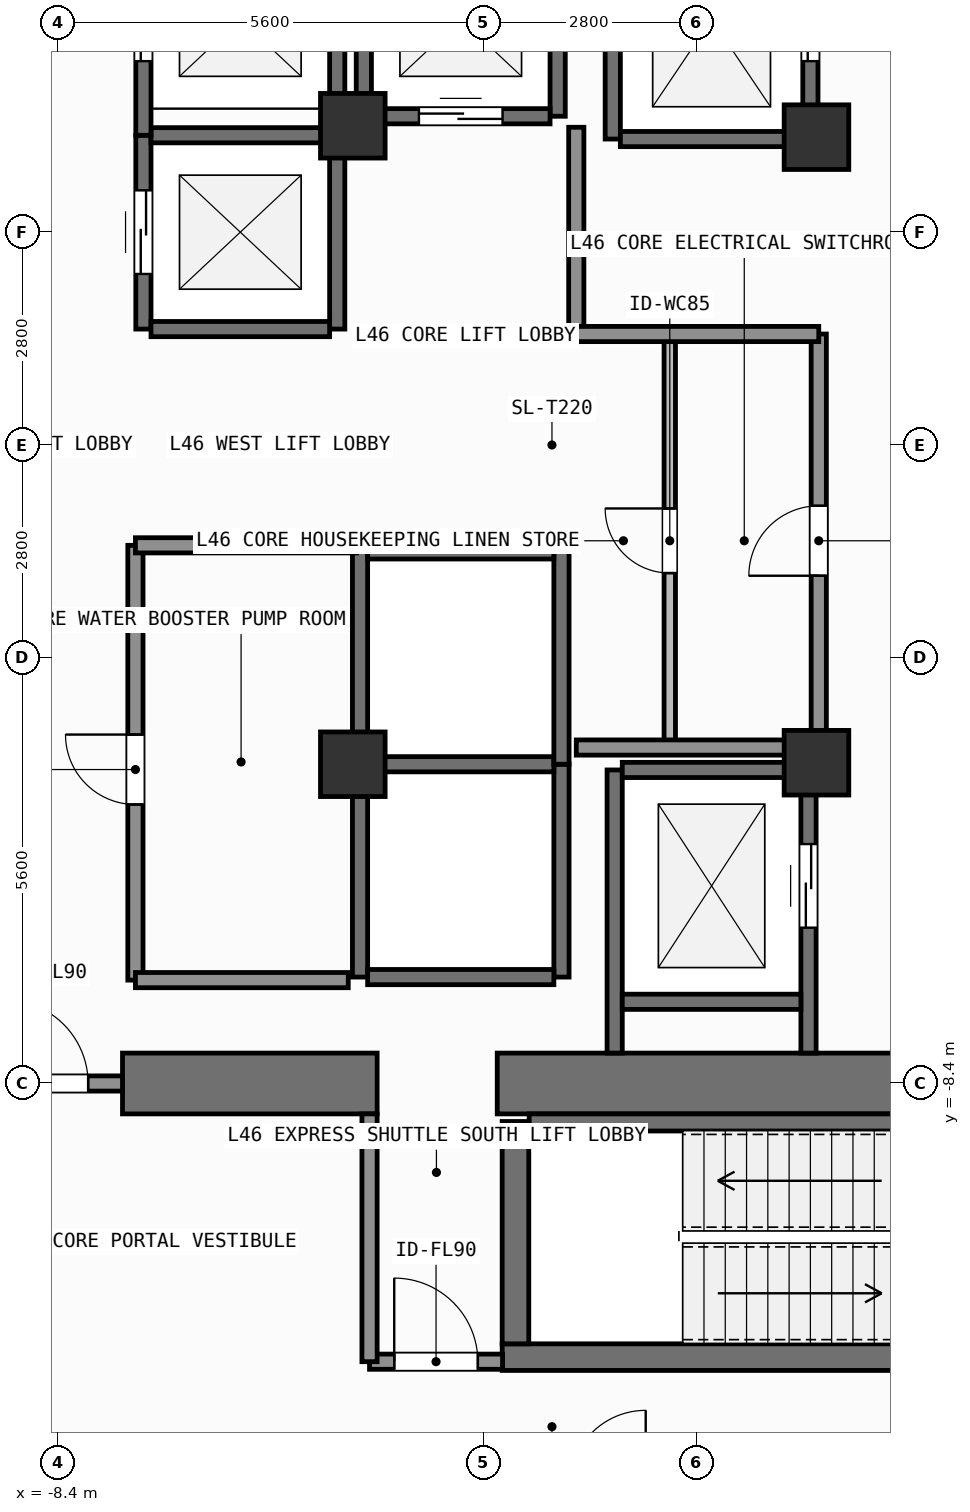
"""IFC4 building model, lengths in metres.
Left out: names, types, materials, properties, quantities, classifications, styles, units other than length and angle.
Written with IfcOpenShell. Run it as: python <this file> out.ifc"""

import sys

from ifc_helpers import new_model, si_unit, direction, frame, frame_2d, origin, origin_2d, place, context, subcontext, project, spatial, rectangle, extrude, element, fill, save


model = new_model("IFC4")
c1 = context("Model", 3, precision=1e-05, world=origin(), true_north=direction((0.0, 1.0)))
c2 = subcontext(c1, "Body", "Model", "MODEL_VIEW")
j1 = project(units=[si_unit("LENGTHUNIT", "METRE"), si_unit("PLANEANGLEUNIT", "RADIAN")], contexts=[c1])
p1 = place(None, origin())
s1 = spatial("IfcSite", under=j1, at=p1, CompositionType="ELEMENT")
p2 = place(p1, origin())
s2 = spatial("IfcBuilding", under=s1, at=p2, CompositionType="ELEMENT")
p3 = place(p2, frame((0.0, 0.0, 187.5)))
s3 = spatial("IfcBuildingStorey", under=s2, at=p3, CompositionType="ELEMENT", Elevation=187.5)
p4 = place(p3, frame((-7.55, -8.4, 0.0), z_axis=(0.0, 0.0, 1.0), x_axis=(1.0, 0.0, 0.0)))
e1 = element("IfcWall", 1, at=p4, inside=s3, PredefinedType="SHEAR", context=c2, shape_type="SweptSolid", body=[
    extrude(rectangle(XDim=3.35, YDim=0.8, at=frame_2d((1.675, 0.0))), origin(), (0.0, 0.0, 1.0), 3.9),
])
p5 = place(p3, frame((-2.62, -8.4, 0.0), z_axis=(0.0, 0.0, 1.0), x_axis=(1.0, 0.0, 0.0)))
e2 = element("IfcWall", 2, at=p5, inside=s3, PredefinedType="SHEAR", context=c2, shape_type="SweptSolid", body=[
    extrude(rectangle(XDim=7.27, YDim=0.8, at=frame_2d((3.635, 0.0))), origin(), (0.0, 0.0, 1.0), 3.9),
])
p6 = place(p3, frame((-2.555, -12.0, 0.0), z_axis=(0.0, 0.0, 1.0), x_axis=(1.0, 0.0, 0.0)))
e3 = element("IfcWall", 3, at=p6, inside=s3, PredefinedType="SHEAR", context=c2, shape_type="SweptSolid", body=[
    extrude(rectangle(XDim=7.31, YDim=0.35, at=frame_2d((3.655, 0.0))), origin(), (0.0, 0.0, 1.0), 3.9),
])
p7 = place(p3, frame((-2.2, -8.913, 0.0), z_axis=(0.0, 0.0, 1.0), x_axis=(1.0, 0.0, 0.0)))
e4 = element("IfcWall", 4, at=p7, inside=s3, PredefinedType="SHEAR", context=c2, shape_type="SweptSolid", body=[
    extrude(rectangle(XDim=6.6, YDim=0.225, at=frame_2d((3.3, 0.0))), origin(), (0.0, 0.0, 1.0), 3.9),
])
p8 = place(p3, frame((-2.38, -11.825, 0.0), z_axis=(0.0, 0.0, 1.0), x_axis=(0.0, 1.0, 0.0)))
e5 = element("IfcWall", 5, at=p8, inside=s3, PredefinedType="SHEAR", context=c2, shape_type="SweptSolid", body=[
    extrude(rectangle(XDim=2.925, YDim=0.35, at=frame_2d((1.462, 0.0))), origin(), (0.0, 0.0, 1.0), 3.9),
])
for number, where, z_axis, x_axis in (
    (6, (-4.52, -4.2, 0.0), (0.0, 0.0, 1.0), (1.0, 0.0, 0.0)),
    (7, (1.58, -4.18, 0.0), (0.0, 0.0, 1.0), (1.0, 0.0, 0.0)),
    (8, (1.58, 4.05, 0.0), (0.0, 0.0, 1.0), (1.0, 0.0, 0.0)),
    (9, (-4.52, 4.2, 0.0), (0.0, 0.0, 1.0), (1.0, 0.0, 0.0)),
):
    element("IfcColumn", number, at=place(p3, frame(where, z_axis=z_axis, x_axis=x_axis)), inside=s3, PredefinedType="COLUMN", context=c2, shape_type="SweptSolid", body=[
        extrude(rectangle(XDim=0.85, YDim=0.85, at=origin_2d()), origin(), (0.0, 0.0, 1.0), 3.9),
    ])
p9 = place(p3, frame((-7.275, 1.525, 0.0), z_axis=(0.0, 0.0, 1.0), x_axis=(0.0, 1.0, 0.0)))
e10 = element("IfcWall", 10, at=p9, inside=s3, PredefinedType="SHEAR", context=c2, shape_type="SweptSolid", body=[
    extrude(rectangle(XDim=2.55, YDim=0.2, at=frame_2d((1.275, 0.0))), origin(), (0.0, 0.0, 1.0), 3.62),
])
p10 = place(p9, frame((0.725, 0.0, 0.0)))
e11 = element("IfcOpeningElement", 11, at=p10, cuts=e10, PredefinedType="OPENING", context=c2, shape_type="SweptSolid", body=[
    extrude(rectangle(XDim=1.1, YDim=2.2, at=frame_2d((0.55, 1.1))), frame((0.0, 0.11, 0.0), z_axis=(0.0, -1.0, 0.0), x_axis=(1.0, 0.0, 0.0)), (0.0, 0.0, 1.0), 0.22),
])
p11 = place(p3, frame((-4.725, 1.525, 0.0), z_axis=(0.0, 0.0, 1.0), x_axis=(0.0, 1.0, 0.0)))
e12 = element("IfcWall", 12, at=p11, inside=s3, PredefinedType="SHEAR", context=c2, shape_type="SweptSolid", body=[
    extrude(rectangle(XDim=2.55, YDim=0.2, at=frame_2d((1.275, 0.0))), origin(), (0.0, 0.0, 1.0), 3.62),
])
for number, where, z_axis, x_axis in (
    (13, (-7.175, 1.525, 0.0), (0.0, 0.0, 1.0), (1.0, 0.0, 0.0)),
    (14, (-7.175, 4.075, 0.0), (0.0, 0.0, 1.0), (1.0, 0.0, 0.0)),
):
    element("IfcWall", number, at=place(p3, frame(where, z_axis=z_axis, x_axis=x_axis)), inside=s3, PredefinedType="SHEAR", context=c2, shape_type="SweptSolid", body=[
        extrude(rectangle(XDim=2.35, YDim=0.2, at=frame_2d((1.175, 0.0))), origin(), (0.0, 0.0, 1.0), 3.62),
    ])
p12 = place(p3, frame((-7.275, 4.075, 0.0), z_axis=(0.0, 0.0, 1.0), x_axis=(0.0, 1.0, 0.0)))
e15 = element("IfcWall", 15, at=p12, inside=s3, PredefinedType="SHEAR", context=c2, shape_type="SweptSolid", body=[
    extrude(rectangle(XDim=2.8, YDim=0.2, at=frame_2d((1.4, 0.0))), origin(), (0.0, 0.0, 1.0), 3.62),
])
p13 = place(p12, frame((0.975, 0.0, 0.0)))
e16 = element("IfcOpeningElement", 16, at=p13, cuts=e15, PredefinedType="OPENING", context=c2, shape_type="SweptSolid", body=[
    extrude(rectangle(XDim=1.1, YDim=2.2, at=frame_2d((0.55, 1.1))), frame((0.0, 0.11, 0.0), z_axis=(0.0, -1.0, 0.0), x_axis=(1.0, 0.0, 0.0)), (0.0, 0.0, 1.0), 0.22),
])
p14 = place(p3, frame((-4.725, 4.075, 0.0), z_axis=(0.0, 0.0, 1.0), x_axis=(0.0, 1.0, 0.0)))
e17 = element("IfcWall", 17, at=p14, inside=s3, PredefinedType="SHEAR", context=c2, shape_type="SweptSolid", body=[
    extrude(rectangle(XDim=2.8, YDim=0.2, at=frame_2d((1.4, 0.0))), origin(), (0.0, 0.0, 1.0), 3.62),
])
for number, where, z_axis, x_axis in (
    (18, (-4.375, 4.325, 0.0), (0.0, 0.0, 1.0), (0.0, 1.0, 0.0)),
    (19, (-1.825, 4.325, 0.0), (0.0, 0.0, 1.0), (0.0, 1.0, 0.0)),
):
    element("IfcWall", number, at=place(p3, frame(where, z_axis=z_axis, x_axis=x_axis)), inside=s3, PredefinedType="SHEAR", context=c2, shape_type="SweptSolid", body=[
        extrude(rectangle(XDim=2.55, YDim=0.2, at=frame_2d((1.275, 0.0))), origin(), (0.0, 0.0, 1.0), 3.62),
    ])
p15 = place(p3, frame((-4.275, 4.325, 0.0), z_axis=(0.0, 0.0, 1.0), x_axis=(1.0, 0.0, 0.0)))
e20 = element("IfcWall", 20, at=p15, inside=s3, PredefinedType="SHEAR", context=c2, shape_type="SweptSolid", body=[
    extrude(rectangle(XDim=2.35, YDim=0.2, at=frame_2d((1.175, 0.0))), origin(), (0.0, 0.0, 1.0), 3.62),
])
p16 = place(p15, frame((0.625, 0.0, 0.0)))
e21 = element("IfcOpeningElement", 21, at=p16, cuts=e20, PredefinedType="OPENING", context=c2, shape_type="SweptSolid", body=[
    extrude(rectangle(XDim=1.1, YDim=2.2, at=frame_2d((0.55, 1.1))), frame((0.0, 0.11, 0.0), z_axis=(0.0, -1.0, 0.0), x_axis=(1.0, 0.0, 0.0)), (0.0, 0.0, 1.0), 0.22),
])
for number, where, z_axis, x_axis in (
    (22, (-4.425, -7.0, 0.0), (0.0, 0.0, 1.0), (0.0, 1.0, 0.0)),
    (23, (-1.775, -7.0, 0.0), (0.0, 0.0, 1.0), (0.0, 1.0, 0.0)),
):
    element("IfcWall", number, at=place(p3, frame(where, z_axis=z_axis, x_axis=x_axis)), inside=s3, PredefinedType="SHEAR", context=c2, shape_type="SweptSolid", body=[
        extrude(rectangle(XDim=2.8, YDim=0.2, at=frame_2d((1.4, 0.0))), origin(), (0.0, 0.0, 1.0), 3.62),
    ])
for number, where, z_axis, x_axis in (
    (24, (-4.325, -7.0, 0.0), (0.0, 0.0, 1.0), (1.0, 0.0, 0.0)),
    (25, (-4.325, -4.2, 0.0), (0.0, 0.0, 1.0), (1.0, 0.0, 0.0)),
):
    element("IfcWall", number, at=place(p3, frame(where, z_axis=z_axis, x_axis=x_axis)), inside=s3, PredefinedType="SHEAR", context=c2, shape_type="SweptSolid", body=[
        extrude(rectangle(XDim=2.45, YDim=0.2, at=frame_2d((1.225, 0.0))), origin(), (0.0, 0.0, 1.0), 3.62),
    ])
for number, where, z_axis, x_axis in (
    (26, (-4.425, -4.2, 0.0), (0.0, 0.0, 1.0), (0.0, 1.0, 0.0)),
    (27, (-1.775, -4.2, 0.0), (0.0, 0.0, 1.0), (0.0, 1.0, 0.0)),
):
    element("IfcWall", number, at=place(p3, frame(where, z_axis=z_axis, x_axis=x_axis)), inside=s3, PredefinedType="SHEAR", context=c2, shape_type="SweptSolid", body=[
        extrude(rectangle(XDim=2.8, YDim=0.2, at=frame_2d((1.4, 0.0))), origin(), (0.0, 0.0, 1.0), 3.62),
    ])
p17 = place(p3, frame((-4.325, -1.4, 0.0), z_axis=(0.0, 0.0, 1.0), x_axis=(1.0, 0.0, 0.0)))
e28 = element("IfcWall", 28, at=p17, inside=s3, PredefinedType="SHEAR", context=c2, shape_type="SweptSolid", body=[
    extrude(rectangle(XDim=2.45, YDim=0.2, at=frame_2d((1.225, 0.0))), origin(), (0.0, 0.0, 1.0), 3.62),
])
p18 = place(p3, frame((-1.1, 4.025, 0.0), z_axis=(0.0, 0.0, 1.0), x_axis=(0.0, 1.0, 0.0)))
e29 = element("IfcWall", 29, at=p18, inside=s3, PredefinedType="SHEAR", context=c2, shape_type="SweptSolid", body=[
    extrude(rectangle(XDim=3.15, YDim=0.2, at=frame_2d((1.575, 0.0))), origin(), (0.0, 0.0, 1.0), 3.62),
])
p19 = place(p3, frame((1.5, 4.025, 0.0), z_axis=(0.0, 0.0, 1.0), x_axis=(0.0, 1.0, 0.0)))
e30 = element("IfcWall", 30, at=p19, inside=s3, PredefinedType="SHEAR", context=c2, shape_type="SweptSolid", body=[
    extrude(rectangle(XDim=3.15, YDim=0.2, at=frame_2d((1.575, 0.0))), origin(), (0.0, 0.0, 1.0), 3.62),
])
p20 = place(p19, frame((1.025, 0.0, 0.0)))
e31 = element("IfcOpeningElement", 31, at=p20, cuts=e30, PredefinedType="OPENING", context=c2, shape_type="SweptSolid", body=[
    extrude(rectangle(XDim=1.1, YDim=2.2, at=frame_2d((0.55, 1.1))), frame((0.0, 0.11, 0.0), z_axis=(0.0, -1.0, 0.0), x_axis=(1.0, 0.0, 0.0)), (0.0, 0.0, 1.0), 0.22),
])
p21 = place(p3, frame((-1.0, 4.025, 0.0), z_axis=(0.0, 0.0, 1.0), x_axis=(1.0, 0.0, 0.0)))
e32 = element("IfcWall", 32, at=p21, inside=s3, PredefinedType="SHEAR", context=c2, shape_type="SweptSolid", body=[
    extrude(rectangle(XDim=2.4, YDim=0.2, at=frame_2d((1.2, 0.0))), origin(), (0.0, 0.0, 1.0), 3.62),
])
p22 = place(p3, frame((-1.075, -8.0, 0.0), z_axis=(0.0, 0.0, 1.0), x_axis=(0.0, 1.0, 0.0)))
e33 = element("IfcWall", 33, at=p22, inside=s3, PredefinedType="SHEAR", context=c2, shape_type="SweptSolid", body=[
    extrude(rectangle(XDim=3.725, YDim=0.2, at=frame_2d((1.863, 0.0))), origin(), (0.0, 0.0, 1.0), 3.62),
])
p23 = place(p3, frame((1.475, -8.0, 0.0), z_axis=(0.0, 0.0, 1.0), x_axis=(0.0, 1.0, 0.0)))
e34 = element("IfcWall", 34, at=p23, inside=s3, PredefinedType="SHEAR", context=c2, shape_type="SweptSolid", body=[
    extrude(rectangle(XDim=3.725, YDim=0.2, at=frame_2d((1.863, 0.0))), origin(), (0.0, 0.0, 1.0), 3.62),
])
p24 = place(p23, frame((1.65, 0.0, 0.0)))
e35 = element("IfcOpeningElement", 35, at=p24, cuts=e34, PredefinedType="OPENING", context=c2, shape_type="SweptSolid", body=[
    extrude(rectangle(XDim=1.1, YDim=2.2, at=frame_2d((0.55, 1.1))), frame((0.0, 0.11, 0.0), z_axis=(0.0, -1.0, 0.0), x_axis=(1.0, 0.0, 0.0)), (0.0, 0.0, 1.0), 0.22),
])
for number, where, z_axis, x_axis in (
    (36, (-0.975, -7.325, 0.0), (0.0, 0.0, 1.0), (1.0, 0.0, 0.0)),
    (37, (-0.975, -4.275, 0.0), (0.0, 0.0, 1.0), (1.0, 0.0, 0.0)),
):
    element("IfcWall", number, at=place(p3, frame(where, z_axis=z_axis, x_axis=x_axis)), inside=s3, PredefinedType="SHEAR", context=c2, shape_type="SweptSolid", body=[
        extrude(rectangle(XDim=2.35, YDim=0.2, at=frame_2d((1.175, 0.0))), origin(), (0.0, 0.0, 1.0), 3.62),
    ])
p25 = place(p3, frame((-9.7, -8.4, 0.0), z_axis=(0.0, 0.0, 1.0), x_axis=(1.0, 0.0, 0.0)))
e38 = element("IfcWall", 38, at=p25, inside=s3, PredefinedType="SOLIDWALL", context=c2, shape_type="SweptSolid", body=[
    extrude(rectangle(XDim=2.15, YDim=0.2, at=frame_2d((1.075, 0.0))), origin(), (0.0, 0.0, 1.0), 2.76),
])
p26 = place(p25, frame((0.598, 0.0, 0.0)))
e39 = element("IfcOpeningElement", 39, at=p26, cuts=e38, PredefinedType="OPENING", context=c2, shape_type="SweptSolid", body=[
    extrude(rectangle(XDim=1.1, YDim=2.15, at=frame_2d((0.55, 1.075))), frame((0.0, 0.11, 0.0), z_axis=(0.0, -1.0, 0.0), x_axis=(1.0, 0.0, 0.0)), (0.0, 0.0, 1.0), 0.22),
])
p27 = place(p3, frame((-4.3, -12.06, 0.0), z_axis=(0.0, 0.0, 1.0), x_axis=(1.0, 0.0, 0.0)))
e40 = element("IfcWall", 40, at=p27, inside=s3, PredefinedType="SOLIDWALL", context=c2, shape_type="SweptSolid", body=[
    extrude(rectangle(XDim=1.75, YDim=0.2, at=frame_2d((0.875, 0.0))), origin(), (0.0, 0.0, 1.0), 3.62),
])
p28 = place(p27, frame((0.325, 0.0, 0.0)))
e41 = element("IfcOpeningElement", 41, at=p28, cuts=e40, PredefinedType="OPENING", context=c2, shape_type="SweptSolid", body=[
    extrude(rectangle(XDim=1.1, YDim=2.15, at=frame_2d((0.55, 1.075))), frame((0.0, 0.11, 0.0), z_axis=(0.0, -1.0, 0.0), x_axis=(1.0, 0.0, 0.0)), (0.0, 0.0, 1.0), 0.22),
])
p29 = place(p3, frame((-0.35, -3.98, 0.0), z_axis=(0.0, 0.0, 1.0), x_axis=(0.0, 1.0, 0.0)))
e42 = element("IfcWall", 42, at=p29, inside=s3, PredefinedType="PARTITIONING", context=c2, shape_type="SweptSolid", body=[
    extrude(rectangle(XDim=5.44, YDim=0.15, at=frame_2d((2.72, 0.0))), origin(), (0.0, 0.0, 1.0), 3.62),
])
p30 = place(p29, frame((2.295, 0.0, 0.0)))
e43 = element("IfcOpeningElement", 43, at=p30, cuts=e42, PredefinedType="OPENING", context=c2, shape_type="SweptSolid", body=[
    extrude(rectangle(XDim=0.85, YDim=2.1, at=frame_2d((0.425, 1.05))), frame((0.0, 0.085, 0.0), z_axis=(0.0, -1.0, 0.0), x_axis=(1.0, 0.0, 0.0)), (0.0, 0.0, 1.0), 0.17),
])
p31 = place(p3, frame((1.61, -3.98, 0.0), z_axis=(0.0, 0.0, 1.0), x_axis=(0.0, 1.0, 0.0)))
e44 = element("IfcWall", 44, at=p31, inside=s3, PredefinedType="SOLIDWALL", context=c2, shape_type="SweptSolid", body=[
    extrude(rectangle(XDim=5.44, YDim=0.2, at=frame_2d((2.72, 0.0))), origin(), (0.0, 0.0, 1.0), 3.62),
])
p32 = place(p31, frame((2.26, 0.0, 0.0)))
e45 = element("IfcOpeningElement", 45, at=p32, cuts=e44, PredefinedType="OPENING", context=c2, shape_type="SweptSolid", body=[
    extrude(rectangle(XDim=0.92, YDim=2.1, at=frame_2d((0.46, 1.05))), frame((0.0, 0.11, 0.0), z_axis=(0.0, -1.0, 0.0), x_axis=(1.0, 0.0, 0.0)), (0.0, 0.0, 1.0), 0.22),
])
p33 = place(p3, frame((-7.38, -7.04, 0.0), z_axis=(0.0, 0.0, 1.0), x_axis=(0.0, 1.0, 0.0)))
e46 = element("IfcWall", 46, at=p33, inside=s3, PredefinedType="SOLIDWALL", context=c2, shape_type="SweptSolid", body=[
    extrude(rectangle(XDim=5.72, YDim=0.2, at=frame_2d((2.86, 0.0))), origin(), (0.0, 0.0, 1.0), 3.62),
])
p34 = place(p33, frame((2.31, 0.0, 0.0)))
e47 = element("IfcOpeningElement", 47, at=p34, cuts=e46, PredefinedType="OPENING", context=c2, shape_type="SweptSolid", body=[
    extrude(rectangle(XDim=0.92, YDim=2.1, at=frame_2d((0.46, 1.05))), frame((0.0, 0.11, 0.0), z_axis=(0.0, -1.0, 0.0), x_axis=(1.0, 0.0, 0.0)), (0.0, 0.0, 1.0), 0.22),
])
p35 = place(p3, frame((-4.3, -12.06, 0.0), z_axis=(0.0, 0.0, 1.0), x_axis=(0.0, 1.0, 0.0)))
e48 = element("IfcWall", 48, at=p35, inside=s3, PredefinedType="SOLIDWALL", context=c2, shape_type="SweptSolid", body=[
    extrude(rectangle(XDim=3.26, YDim=0.2, at=frame_2d((1.63, 0.0))), origin(), (0.0, 0.0, 1.0), 3.62),
])
p36 = place(p3, frame((-7.38, -1.32, 0.0), z_axis=(0.0, 0.0, 1.0), x_axis=(1.0, 0.0, 0.0)))
e49 = element("IfcWall", 49, at=p36, inside=s3, PredefinedType="SOLIDWALL", context=c2, shape_type="SweptSolid", body=[
    extrude(rectangle(XDim=2.91, YDim=0.2, at=frame_2d((1.455, 0.0))), origin(), (0.0, 0.0, 1.0), 3.62),
])
p37 = place(p3, frame((-1.58, 1.48, 0.0), z_axis=(0.0, 0.0, 1.0), x_axis=(0.0, 1.0, 0.0)))
e50 = element("IfcWall", 50, at=p37, inside=s3, PredefinedType="SOLIDWALL", context=c2, shape_type="SweptSolid", body=[
    extrude(rectangle(XDim=2.7, YDim=0.2, at=frame_2d((1.35, 0.0))), origin(), (0.0, 0.0, 1.0), 3.62),
])
for number, where, z_axis, x_axis in (
    (51, (-1.58, -3.98, 0.0), (0.0, 0.0, 1.0), (1.0, 0.0, 0.0)),
    (52, (-1.58, 1.46, 0.0), (0.0, 0.0, 1.0), (1.0, 0.0, 0.0)),
):
    element("IfcWall", number, at=place(p3, frame(where, z_axis=z_axis, x_axis=x_axis)), inside=s3, PredefinedType="SOLIDWALL", context=c2, shape_type="SweptSolid", body=[
        extrude(rectangle(XDim=3.19, YDim=0.2, at=frame_2d((1.595, 0.0))), origin(), (0.0, 0.0, 1.0), 3.62),
    ])
p38 = place(p3, frame((-7.38, -7.04, 0.0), z_axis=(0.0, 0.0, 1.0), x_axis=(1.0, 0.0, 0.0)))
e53 = element("IfcWall", 53, at=p38, inside=s3, PredefinedType="SOLIDWALL", context=c2, shape_type="SweptSolid", body=[
    extrude(rectangle(XDim=2.8, YDim=0.2, at=frame_2d((1.4, 0.0))), origin(), (0.0, 0.0, 1.0), 3.62),
])
p39 = place(p10, origin())
e54 = element("IfcDoor", 54, at=p39, inside=s3, OperationType="SLIDING_TO_LEFT", PredefinedType="DOOR", context=c2, shape_type="SweptSolid", body=[
    extrude(rectangle(XDim=1.1, YDim=2.2, at=frame_2d((0.55, 1.1))), frame((0.0, 0.025, 0.0), z_axis=(0.0, -1.0, 0.0), x_axis=(1.0, 0.0, 0.0)), (0.0, 0.0, 1.0), 0.05),
])
fill(e11, e54)
p40 = place(p13, origin())
e55 = element("IfcDoor", 55, at=p40, inside=s3, OperationType="SLIDING_TO_LEFT", PredefinedType="DOOR", context=c2, shape_type="SweptSolid", body=[
    extrude(rectangle(XDim=1.1, YDim=2.2, at=frame_2d((0.55, 1.1))), frame((0.0, 0.025, 0.0), z_axis=(0.0, -1.0, 0.0), x_axis=(1.0, 0.0, 0.0)), (0.0, 0.0, 1.0), 0.05),
])
fill(e16, e55)
p41 = place(p16, origin())
e56 = element("IfcDoor", 56, at=p41, inside=s3, OperationType="SLIDING_TO_LEFT", PredefinedType="DOOR", context=c2, shape_type="SweptSolid", body=[
    extrude(rectangle(XDim=1.1, YDim=2.2, at=frame_2d((0.55, 1.1))), frame((0.0, 0.025, 0.0), z_axis=(0.0, -1.0, 0.0), x_axis=(1.0, 0.0, 0.0)), (0.0, 0.0, 1.0), 0.05),
])
fill(e21, e56)
p42 = place(p20, origin())
e57 = element("IfcDoor", 57, at=p42, inside=s3, OperationType="SLIDING_TO_LEFT", PredefinedType="DOOR", context=c2, shape_type="SweptSolid", body=[
    extrude(rectangle(XDim=1.1, YDim=2.2, at=frame_2d((0.55, 1.1))), frame((0.0, 0.025, 0.0), z_axis=(0.0, -1.0, 0.0), x_axis=(1.0, 0.0, 0.0)), (0.0, 0.0, 1.0), 0.05),
])
fill(e31, e57)
p43 = place(p24, origin())
e58 = element("IfcDoor", 58, at=p43, inside=s3, OperationType="SLIDING_TO_LEFT", PredefinedType="DOOR", context=c2, shape_type="SweptSolid", body=[
    extrude(rectangle(XDim=1.1, YDim=2.2, at=frame_2d((0.55, 1.1))), frame((0.0, 0.025, 0.0), z_axis=(0.0, -1.0, 0.0), x_axis=(1.0, 0.0, 0.0)), (0.0, 0.0, 1.0), 0.05),
])
fill(e35, e58)
p44 = place(p26, origin())
e59 = element("IfcDoor", 59, at=p44, inside=s3, OperationType="SINGLE_SWING_LEFT", PredefinedType="DOOR", context=c2, shape_type="SweptSolid", body=[
    extrude(rectangle(XDim=1.1, YDim=2.15, at=frame_2d((0.55, 1.075))), frame((0.0, 0.025, 0.0), z_axis=(0.0, -1.0, 0.0), x_axis=(1.0, 0.0, 0.0)), (0.0, 0.0, 1.0), 0.05),
])
fill(e39, e59)
p45 = place(p28, origin())
e60 = element("IfcDoor", 60, at=p45, inside=s3, OperationType="SINGLE_SWING_LEFT", PredefinedType="DOOR", context=c2, shape_type="SweptSolid", body=[
    extrude(rectangle(XDim=1.1, YDim=2.15, at=frame_2d((0.55, 1.075))), frame((0.0, 0.025, 0.0), z_axis=(0.0, -1.0, 0.0), x_axis=(1.0, 0.0, 0.0)), (0.0, 0.0, 1.0), 0.05),
])
fill(e41, e60)
p46 = place(p30, origin())
e61 = element("IfcDoor", 61, at=p46, inside=s3, OperationType="SINGLE_SWING_RIGHT", PredefinedType="DOOR", context=c2, shape_type="SweptSolid", body=[
    extrude(rectangle(XDim=0.85, YDim=2.1, at=frame_2d((0.425, 1.05))), frame((0.0, 0.025, 0.0), z_axis=(0.0, -1.0, 0.0), x_axis=(1.0, 0.0, 0.0)), (0.0, 0.0, 1.0), 0.05),
])
fill(e43, e61)
p47 = place(p32, origin())
e62 = element("IfcDoor", 62, at=p47, inside=s3, OperationType="SINGLE_SWING_LEFT", PredefinedType="DOOR", context=c2, shape_type="SweptSolid", body=[
    extrude(rectangle(XDim=0.92, YDim=2.1, at=frame_2d((0.46, 1.05))), frame((0.0, 0.025, 0.0), z_axis=(0.0, -1.0, 0.0), x_axis=(1.0, 0.0, 0.0)), (0.0, 0.0, 1.0), 0.05),
])
fill(e45, e62)
p48 = place(p34, origin())
e63 = element("IfcDoor", 63, at=p48, inside=s3, OperationType="SINGLE_SWING_RIGHT", PredefinedType="DOOR", context=c2, shape_type="SweptSolid", body=[
    extrude(rectangle(XDim=0.92, YDim=2.1, at=frame_2d((0.46, 1.05))), frame((0.0, 0.025, 0.0), z_axis=(0.0, -1.0, 0.0), x_axis=(1.0, 0.0, 0.0)), (0.0, 0.0, 1.0), 0.05),
])
fill(e47, e63)
save(model, sys.argv[1])
